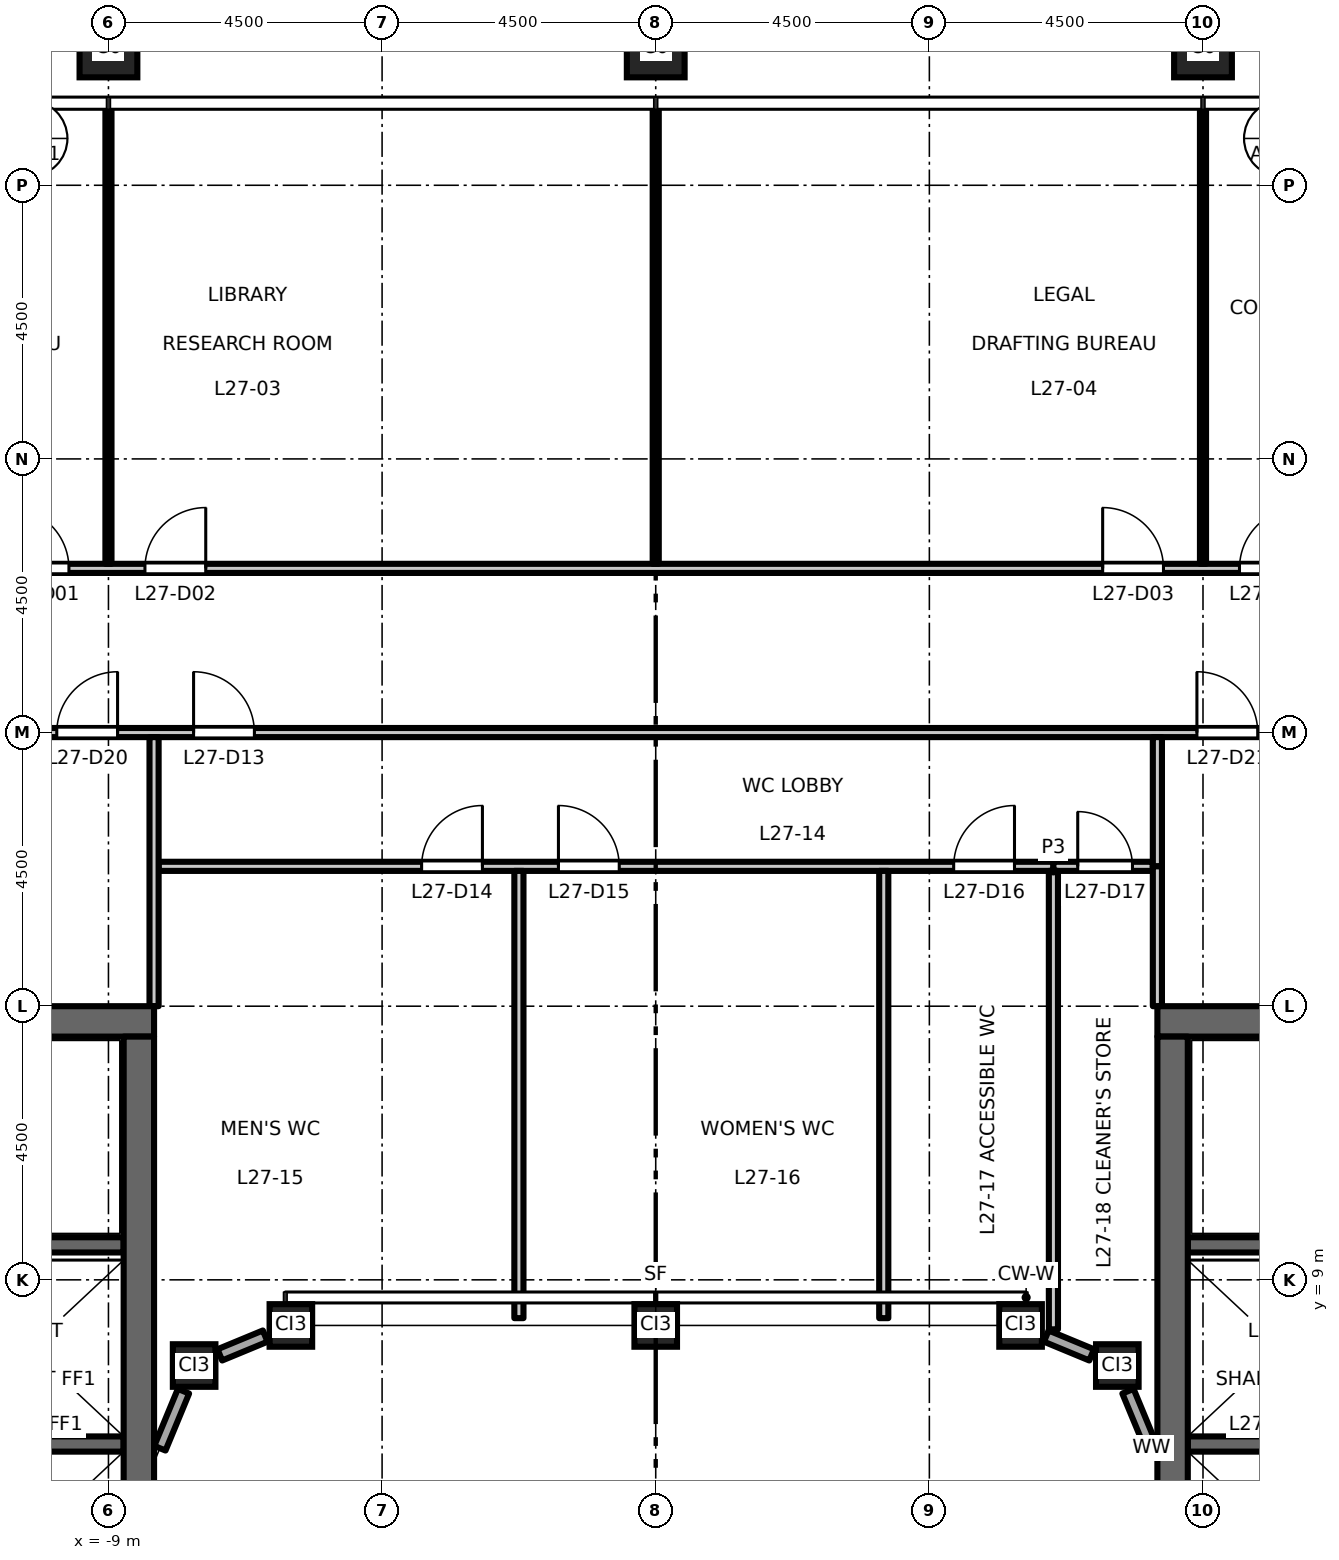
"""IFC4 building model, lengths in metres.
Left out: names, types, materials, properties, quantities, classifications, styles, units other than length and angle.
Written with IfcOpenShell. Run it as: python <this file> out.ifc"""

import sys

from ifc_helpers import new_model, si_unit, direction, frame, frame_2d, origin, origin_2d, place, context, subcontext, project, spatial, rectangle, hollow_rectangle, extrude, element, fill, save


model = new_model("IFC4")
c1 = context("Model", 3, precision=1e-05, world=origin(), true_north=direction((0.0, 1.0)))
c2 = subcontext(c1, "Body", "Model", "MODEL_VIEW")
j1 = project(units=[si_unit("LENGTHUNIT", "METRE"), si_unit("PLANEANGLEUNIT", "RADIAN")], contexts=[c1])
p1 = place(None, origin())
s1 = spatial("IfcSite", under=j1, at=p1, CompositionType="ELEMENT")
p2 = place(p1, origin())
s2 = spatial("IfcBuilding", under=s1, at=p2, CompositionType="ELEMENT")
p3 = place(p2, frame((0.0, 0.0, 127.2)))
s3 = spatial("IfcBuildingStorey", under=s2, at=p3, CompositionType="ELEMENT", Elevation=127.2)
for number, where, z_axis, x_axis in (
    (1, (9.0, 29.25, 0.0), (0.0, 0.0, 1.0), (1.0, 0.0, 0.0)),
    (2, (0.0, 29.25, 0.0), (0.0, 0.0, 1.0), (1.0, 0.0, 0.0)),
    (3, (-9.0, 29.25, 0.0), (0.0, 0.0, 1.0), (1.0, 0.0, 0.0)),
):
    element("IfcColumn", number, at=place(p3, frame(where, z_axis=z_axis, x_axis=x_axis)), inside=s3, PredefinedType="COLUMN", context=c2, shape_type="SweptSolid", body=[
        extrude(hollow_rectangle(XDim=0.95, YDim=0.95, WallThickness=0.055, at=origin_2d()), origin(), (0.0, 0.0, 1.0), 4.5),
    ])
for number, where, z_axis, x_axis in (
    (4, (-7.591, 7.591, 0.0), (0.0, 0.0, 1.0), (1.0, 0.0, 0.0)),
    (5, (-6.0, 8.25, 0.0), (0.0, 0.0, 1.0), (1.0, 0.0, 0.0)),
    (6, (0.0, 8.25, 0.0), (0.0, 0.0, 1.0), (1.0, 0.0, 0.0)),
    (7, (6.0, 8.25, 0.0), (0.0, 0.0, 1.0), (1.0, 0.0, 0.0)),
    (8, (7.591, 7.591, 0.0), (0.0, 0.0, 1.0), (1.0, 0.0, 0.0)),
):
    element("IfcColumn", number, at=place(p3, frame(where, z_axis=z_axis, x_axis=x_axis)), inside=s3, PredefinedType="COLUMN", context=c2, shape_type="SweptSolid", body=[
        extrude(hollow_rectangle(XDim=0.7, YDim=0.7, WallThickness=0.04, at=origin_2d()), origin(), (0.0, 0.0, 1.0), 4.5),
    ])
p4 = place(p3, frame((-8.75, 6.3, 0.0), z_axis=(0.0, 0.0, 1.0), x_axis=(-1.0, 0.0, 0.0)))
e9 = element("IfcWall", 9, at=p4, inside=s3, PredefinedType="SHEAR", context=c2, shape_type="SweptSolid", body=[
    extrude(rectangle(XDim=3.1, YDim=0.25, at=frame_2d((1.55, 0.0))), origin(), (0.0, 0.0, 1.0), 4.35),
])
p5 = place(p3, frame((-8.75, 9.575, 0.0), z_axis=(0.0, 0.0, 1.0), x_axis=(-1.0, 0.0, 0.0)))
e10 = element("IfcWall", 10, at=p5, inside=s3, PredefinedType="SHEAR", context=c2, shape_type="SweptSolid", body=[
    extrude(rectangle(XDim=8.0, YDim=0.25, at=frame_2d((4.0, 0.0))), origin(), (0.0, 0.0, 1.0), 4.35),
])
p6 = place(p5, frame((6.65, 0.0, 0.0)))
e11 = element("IfcOpeningElement", 11, at=p6, cuts=e10, PredefinedType="OPENING", context=c2, shape_type="SweptSolid", body=[
    extrude(rectangle(XDim=1.1, YDim=2.1, at=frame_2d((0.55, 1.05))), frame((0.0, 0.135, 0.0), z_axis=(0.0, -1.0, 0.0), x_axis=(1.0, 0.0, 0.0)), (0.0, 0.0, 1.0), 0.27),
])
p7 = place(p3, frame((-8.25, 13.25, 0.0), z_axis=(0.0, 0.0, 1.0), x_axis=(-1.0, 0.0, 0.0)))
e12 = element("IfcWall", 12, at=p7, inside=s3, PredefinedType="SHEAR", context=c2, shape_type="SweptSolid", body=[
    extrude(rectangle(XDim=13.5, YDim=0.5, at=frame_2d((6.75, 0.0))), origin(), (0.0, 0.0, 1.0), 4.35),
])
p8 = place(p3, frame((-8.5, -13.0, 0.0), z_axis=(0.0, 0.0, 1.0), x_axis=(0.0, 1.0, 0.0)))
e13 = element("IfcWall", 13, at=p8, inside=s3, PredefinedType="SHEAR", context=c2, shape_type="SweptSolid", body=[
    extrude(rectangle(XDim=26.0, YDim=0.5, at=frame_2d((13.0, 0.0))), origin(), (0.0, 0.0, 1.0), 4.35),
])
p9 = place(p3, frame((8.75, 6.3, 0.0), z_axis=(0.0, 0.0, 1.0), x_axis=(1.0, 0.0, 0.0)))
e14 = element("IfcWall", 14, at=p9, inside=s3, PredefinedType="SHEAR", context=c2, shape_type="SweptSolid", body=[
    extrude(rectangle(XDim=3.1, YDim=0.25, at=frame_2d((1.55, 0.0))), origin(), (0.0, 0.0, 1.0), 4.35),
])
p10 = place(p3, frame((8.75, 9.575, 0.0), z_axis=(0.0, 0.0, 1.0), x_axis=(1.0, 0.0, 0.0)))
e15 = element("IfcWall", 15, at=p10, inside=s3, PredefinedType="SHEAR", context=c2, shape_type="SweptSolid", body=[
    extrude(rectangle(XDim=8.0, YDim=0.25, at=frame_2d((4.0, 0.0))), origin(), (0.0, 0.0, 1.0), 4.35),
])
p11 = place(p10, frame((6.65, 0.0, 0.0)))
e16 = element("IfcOpeningElement", 16, at=p11, cuts=e15, PredefinedType="OPENING", context=c2, shape_type="SweptSolid", body=[
    extrude(rectangle(XDim=1.1, YDim=2.1, at=frame_2d((0.55, 1.05))), frame((0.0, 0.135, 0.0), z_axis=(0.0, -1.0, 0.0), x_axis=(1.0, 0.0, 0.0)), (0.0, 0.0, 1.0), 0.27),
])
p12 = place(p3, frame((8.25, 13.25, 0.0), z_axis=(0.0, 0.0, 1.0), x_axis=(1.0, 0.0, 0.0)))
e17 = element("IfcWall", 17, at=p12, inside=s3, PredefinedType="SHEAR", context=c2, shape_type="SweptSolid", body=[
    extrude(rectangle(XDim=13.5, YDim=0.5, at=frame_2d((6.75, 0.0))), origin(), (0.0, 0.0, 1.0), 4.35),
])
p13 = place(p3, frame((8.5, -13.0, 0.0), z_axis=(0.0, 0.0, 1.0), x_axis=(0.0, 1.0, 0.0)))
e18 = element("IfcWall", 18, at=p13, inside=s3, PredefinedType="SHEAR", context=c2, shape_type="SweptSolid", body=[
    extrude(rectangle(XDim=26.0, YDim=0.5, at=frame_2d((13.0, 0.0))), origin(), (0.0, 0.0, 1.0), 4.35),
])
p14 = place(p3, frame((8.154, 6.231, 0.0), z_axis=(0.0, 0.0, 1.0), x_axis=(-0.382769662028, 0.923843810301, 0.0)))
e19 = element("IfcWall", 19, at=p14, inside=s3, PredefinedType="STANDARD", context=c2, shape_type="SweptSolid", body=[
    extrude(rectangle(XDim=1.015, YDim=0.2, at=frame_2d((0.507, 0.0))), origin(), (0.0, 0.0, 1.0), 3.826),
])
for number, where, z_axis, x_axis in (
    (20, (7.168, 7.766, 0.0), (0.0, 0.0, 1.0), (-0.924, 0.383, 0.0)),
    (21, (-6.423, 8.075, 0.0), (0.0, 0.0, 1.0), (-0.924, -0.383, 0.0)),
):
    element("IfcWall", number, at=place(p3, frame(where, z_axis=z_axis, x_axis=x_axis)), inside=s3, PredefinedType="STANDARD", context=c2, shape_type="SweptSolid", body=[
        extrude(rectangle(XDim=0.807, YDim=0.2, at=frame_2d((0.404, 0.0))), origin(), (0.0, 0.0, 1.0), 3.826),
    ])
p15 = place(p3, frame((-7.766, 7.168, 0.0), z_axis=(0.0, 0.0, 1.0), x_axis=(-0.382769662028, -0.923843810301, 0.0)))
e22 = element("IfcWall", 22, at=p15, inside=s3, PredefinedType="STANDARD", context=c2, shape_type="SweptSolid", body=[
    extrude(rectangle(XDim=1.015, YDim=0.2, at=frame_2d((0.507, 0.0))), origin(), (0.0, 0.0, 1.0), 3.826),
])
p16 = place(p3, frame((-8.175, 15.8, 0.0), z_axis=(0.0, 0.0, 1.0), x_axis=(1.0, 0.0, 0.0)))
e23 = element("IfcWall", 23, at=p16, inside=s3, PredefinedType="PARTITIONING", context=c2, shape_type="SweptSolid", body=[
    extrude(rectangle(XDim=14.715, YDim=0.15, at=frame_2d((7.357, 0.0))), origin(), (0.0, 0.0, 1.0), 4.35),
])
p17 = place(p16, frame((4.325, 0.0, 0.0)))
e24 = element("IfcOpeningElement", 24, at=p17, cuts=e23, PredefinedType="OPENING", context=c2, shape_type="SweptSolid", body=[
    extrude(rectangle(XDim=1.0, YDim=2.1, at=frame_2d((0.5, 1.05))), frame((0.0, 0.085, 0.0), z_axis=(0.0, -1.0, 0.0), x_axis=(1.0, 0.0, 0.0)), (0.0, 0.0, 1.0), 0.17),
])
p18 = place(p16, frame((6.575, 0.0, 0.0)))
e25 = element("IfcOpeningElement", 25, at=p18, cuts=e23, PredefinedType="OPENING", context=c2, shape_type="SweptSolid", body=[
    extrude(rectangle(XDim=1.0, YDim=2.1, at=frame_2d((0.5, 1.05))), frame((0.0, 0.085, 0.0), z_axis=(0.0, -1.0, 0.0), x_axis=(1.0, 0.0, 0.0)), (0.0, 0.0, 1.0), 0.17),
])
p19 = place(p16, frame((13.075, 0.0, 0.0)))
e26 = element("IfcOpeningElement", 26, at=p19, cuts=e23, PredefinedType="OPENING", context=c2, shape_type="SweptSolid", body=[
    extrude(rectangle(XDim=1.0, YDim=2.1, at=frame_2d((0.5, 1.05))), frame((0.0, 0.085, 0.0), z_axis=(0.0, -1.0, 0.0), x_axis=(1.0, 0.0, 0.0)), (0.0, 0.0, 1.0), 0.17),
])
p20 = place(p3, frame((6.54, 15.8, 0.0), z_axis=(0.0, 0.0, 1.0), x_axis=(1.0, 0.0, 0.0)))
e27 = element("IfcWall", 27, at=p20, inside=s3, PredefinedType="PARTITIONING", context=c2, shape_type="SweptSolid", body=[
    extrude(rectangle(XDim=1.635, YDim=0.15, at=frame_2d((0.817, 0.0))), origin(), (0.0, 0.0, 1.0), 4.35),
])
p21 = place(p20, frame((0.4, 0.0, 0.0)))
e28 = element("IfcOpeningElement", 28, at=p21, cuts=e27, PredefinedType="OPENING", context=c2, shape_type="SweptSolid", body=[
    extrude(rectangle(XDim=0.9, YDim=2.1, at=frame_2d((0.45, 1.05))), frame((0.0, 0.085, 0.0), z_axis=(0.0, -1.0, 0.0), x_axis=(1.0, 0.0, 0.0)), (0.0, 0.0, 1.0), 0.17),
])
p22 = place(p3, frame((-21.825, 18.0, 0.0), z_axis=(0.0, 0.0, 1.0), x_axis=(1.0, 0.0, 0.0)))
e29 = element("IfcWall", 29, at=p22, inside=s3, PredefinedType="PARTITIONING", context=c2, shape_type="SweptSolid", body=[
    extrude(rectangle(XDim=43.65, YDim=0.15, at=frame_2d((21.825, 0.0))), origin(), (0.0, 0.0, 1.0), 4.35),
])
p23 = place(p22, frame((14.225, 0.0, 0.0)))
e30 = element("IfcOpeningElement", 30, at=p23, cuts=e29, PredefinedType="OPENING", context=c2, shape_type="SweptSolid", body=[
    extrude(rectangle(XDim=1.0, YDim=2.1, at=frame_2d((0.5, 1.05))), frame((0.0, 0.085, 0.0), z_axis=(0.0, -1.0, 0.0), x_axis=(1.0, 0.0, 0.0)), (0.0, 0.0, 1.0), 0.17),
])
p24 = place(p22, frame((11.975, 0.0, 0.0)))
e31 = element("IfcOpeningElement", 31, at=p24, cuts=e29, PredefinedType="OPENING", context=c2, shape_type="SweptSolid", body=[
    extrude(rectangle(XDim=1.0, YDim=2.1, at=frame_2d((0.5, 1.05))), frame((0.0, 0.085, 0.0), z_axis=(0.0, -1.0, 0.0), x_axis=(1.0, 0.0, 0.0)), (0.0, 0.0, 1.0), 0.17),
])
p25 = place(p22, frame((30.725, 0.0, 0.0)))
e32 = element("IfcOpeningElement", 32, at=p25, cuts=e29, PredefinedType="OPENING", context=c2, shape_type="SweptSolid", body=[
    extrude(rectangle(XDim=1.0, YDim=2.1, at=frame_2d((0.5, 1.05))), frame((0.0, 0.085, 0.0), z_axis=(0.0, -1.0, 0.0), x_axis=(1.0, 0.0, 0.0)), (0.0, 0.0, 1.0), 0.17),
])
p26 = place(p3, frame((-27.06, 20.7, 0.0), z_axis=(0.0, 0.0, 1.0), x_axis=(1.0, 0.0, 0.0)))
e33 = element("IfcWall", 33, at=p26, inside=s3, PredefinedType="PARTITIONING", context=c2, shape_type="SweptSolid", body=[
    extrude(rectangle(XDim=54.12, YDim=0.15, at=frame_2d((27.06, 0.0))), origin(), (0.0, 0.0, 1.0), 4.35),
])
p27 = place(p26, frame((16.41, 0.0, 0.0)))
e34 = element("IfcOpeningElement", 34, at=p27, cuts=e33, PredefinedType="OPENING", context=c2, shape_type="SweptSolid", body=[
    extrude(rectangle(XDim=1.0, YDim=2.1, at=frame_2d((0.5, 1.05))), frame((0.0, 0.085, 0.0), z_axis=(0.0, -1.0, 0.0), x_axis=(1.0, 0.0, 0.0)), (0.0, 0.0, 1.0), 0.17),
])
p28 = place(p26, frame((18.66, 0.0, 0.0)))
e35 = element("IfcOpeningElement", 35, at=p28, cuts=e33, PredefinedType="OPENING", context=c2, shape_type="SweptSolid", body=[
    extrude(rectangle(XDim=1.0, YDim=2.1, at=frame_2d((0.5, 1.05))), frame((0.0, 0.085, 0.0), z_axis=(0.0, -1.0, 0.0), x_axis=(1.0, 0.0, 0.0)), (0.0, 0.0, 1.0), 0.17),
])
p29 = place(p26, frame((34.41, 0.0, 0.0)))
e36 = element("IfcOpeningElement", 36, at=p29, cuts=e33, PredefinedType="OPENING", context=c2, shape_type="SweptSolid", body=[
    extrude(rectangle(XDim=1.0, YDim=2.1, at=frame_2d((0.5, 1.05))), frame((0.0, 0.085, 0.0), z_axis=(0.0, -1.0, 0.0), x_axis=(1.0, 0.0, 0.0)), (0.0, 0.0, 1.0), 0.17),
])
p30 = place(p26, frame((36.66, 0.0, 0.0)))
e37 = element("IfcOpeningElement", 37, at=p30, cuts=e33, PredefinedType="OPENING", context=c2, shape_type="SweptSolid", body=[
    extrude(rectangle(XDim=1.0, YDim=2.1, at=frame_2d((0.5, 1.05))), frame((0.0, 0.085, 0.0), z_axis=(0.0, -1.0, 0.0), x_axis=(1.0, 0.0, 0.0)), (0.0, 0.0, 1.0), 0.17),
])
p31 = place(p26, frame((7.41, 0.0, 0.0)))
e38 = element("IfcOpeningElement", 38, at=p31, cuts=e33, PredefinedType="OPENING", context=c2, shape_type="SweptSolid", body=[
    extrude(rectangle(XDim=1.0, YDim=2.1, at=frame_2d((0.5, 1.05))), frame((0.0, 0.085, 0.0), z_axis=(0.0, -1.0, 0.0), x_axis=(1.0, 0.0, 0.0)), (0.0, 0.0, 1.0), 0.17),
])
p32 = place(p26, frame((45.72, 0.0, 0.0)))
e39 = element("IfcOpeningElement", 39, at=p32, cuts=e33, PredefinedType="OPENING", context=c2, shape_type="SweptSolid", body=[
    extrude(rectangle(XDim=1.0, YDim=2.1, at=frame_2d((0.5, 1.05))), frame((0.0, 0.085, 0.0), z_axis=(0.0, -1.0, 0.0), x_axis=(1.0, 0.0, 0.0)), (0.0, 0.0, 1.0), 0.17),
])
p33 = place(p3, frame((-9.0, 20.775, 0.0), z_axis=(0.0, 0.0, 1.0), x_axis=(0.0, 1.0, 0.0)))
e40 = element("IfcWall", 40, at=p33, inside=s3, PredefinedType="PARTITIONING", context=c2, shape_type="SweptSolid", body=[
    extrude(rectangle(XDim=7.485, YDim=0.1, at=frame_2d((3.743, 0.0))), origin(), (0.0, 0.0, 1.0), 3.45),
])
p34 = place(p3, frame((-8.25, 13.5, 0.0), z_axis=(0.0, 0.0, 1.0), x_axis=(0.0, 1.0, 0.0)))
e41 = element("IfcWall", 41, at=p34, inside=s3, PredefinedType="PARTITIONING", context=c2, shape_type="SweptSolid", body=[
    extrude(rectangle(XDim=4.425, YDim=0.15, at=frame_2d((2.212, 0.0))), origin(), (0.0, 0.0, 1.0), 4.35),
])
p35 = place(p3, frame((-2.25, 8.37, 0.0), z_axis=(0.0, 0.0, 1.0), x_axis=(0.0, 1.0, 0.0)))
e42 = element("IfcWall", 42, at=p35, inside=s3, PredefinedType="PARTITIONING", context=c2, shape_type="SweptSolid", body=[
    extrude(rectangle(XDim=7.355, YDim=0.15, at=frame_2d((3.677, 0.0))), origin(), (0.0, 0.0, 1.0), 4.35),
])
p36 = place(p3, frame((0.0, 20.775, 0.0), z_axis=(0.0, 0.0, 1.0), x_axis=(0.0, 1.0, 0.0)))
e43 = element("IfcWall", 43, at=p36, inside=s3, PredefinedType="PARTITIONING", context=c2, shape_type="SweptSolid", body=[
    extrude(rectangle(XDim=7.485, YDim=0.1, at=frame_2d((3.743, 0.0))), origin(), (0.0, 0.0, 1.0), 3.45),
])
p37 = place(p3, frame((3.75, 8.37, 0.0), z_axis=(0.0, 0.0, 1.0), x_axis=(0.0, 1.0, 0.0)))
e44 = element("IfcWall", 44, at=p37, inside=s3, PredefinedType="PARTITIONING", context=c2, shape_type="SweptSolid", body=[
    extrude(rectangle(XDim=7.355, YDim=0.15, at=frame_2d((3.677, 0.0))), origin(), (0.0, 0.0, 1.0), 4.35),
])
p38 = place(p3, frame((6.54, 8.186, 0.0), z_axis=(0.0, 0.0, 1.0), x_axis=(0.0, 1.0, 0.0)))
e45 = element("IfcWall", 45, at=p38, inside=s3, PredefinedType="PARTITIONING", context=c2, shape_type="SweptSolid", body=[
    extrude(rectangle(XDim=7.539, YDim=0.15, at=frame_2d((3.77, 0.0))), origin(), (0.0, 0.0, 1.0), 4.35),
])
p39 = place(p3, frame((8.25, 15.8, 0.0), z_axis=(0.0, 0.0, 1.0), x_axis=(0.0, 1.0, 0.0)))
e46 = element("IfcWall", 46, at=p39, inside=s3, PredefinedType="PARTITIONING", context=c2, shape_type="SweptSolid", body=[
    extrude(rectangle(XDim=2.125, YDim=0.15, at=frame_2d((1.062, 0.0))), origin(), (0.0, 0.0, 1.0), 4.35),
])
p40 = place(p3, frame((8.25, 13.5, 0.0), z_axis=(0.0, 0.0, 1.0), x_axis=(0.0, 1.0, 0.0)))
e47 = element("IfcWall", 47, at=p40, inside=s3, PredefinedType="PARTITIONING", context=c2, shape_type="SweptSolid", body=[
    extrude(rectangle(XDim=2.3, YDim=0.15, at=frame_2d((1.15, 0.0))), origin(), (0.0, 0.0, 1.0), 4.35),
])
p41 = place(p3, frame((9.0, 20.775, 0.0), z_axis=(0.0, 0.0, 1.0), x_axis=(0.0, 1.0, 0.0)))
e48 = element("IfcWall", 48, at=p41, inside=s3, PredefinedType="PARTITIONING", context=c2, shape_type="SweptSolid", body=[
    extrude(rectangle(XDim=7.485, YDim=0.1, at=frame_2d((3.743, 0.0))), origin(), (0.0, 0.0, 1.0), 3.45),
])
p42 = place(p27, origin())
e49 = element("IfcDoor", 49, at=p42, inside=s3, OperationType="SINGLE_SWING_LEFT", PredefinedType="DOOR", context=c2, shape_type="SweptSolid", body=[
    extrude(rectangle(XDim=1.0, YDim=2.1, at=frame_2d((0.5, 1.05))), frame((0.0, 0.025, 0.0), z_axis=(0.0, -1.0, 0.0), x_axis=(1.0, 0.0, 0.0)), (0.0, 0.0, 1.0), 0.05),
])
fill(e34, e49)
p43 = place(p28, origin())
e50 = element("IfcDoor", 50, at=p43, inside=s3, OperationType="SINGLE_SWING_RIGHT", PredefinedType="DOOR", context=c2, shape_type="SweptSolid", body=[
    extrude(rectangle(XDim=1.0, YDim=2.1, at=frame_2d((0.5, 1.05))), frame((0.0, 0.025, 0.0), z_axis=(0.0, -1.0, 0.0), x_axis=(1.0, 0.0, 0.0)), (0.0, 0.0, 1.0), 0.05),
])
fill(e35, e50)
p44 = place(p29, origin())
e51 = element("IfcDoor", 51, at=p44, inside=s3, OperationType="SINGLE_SWING_LEFT", PredefinedType="DOOR", context=c2, shape_type="SweptSolid", body=[
    extrude(rectangle(XDim=1.0, YDim=2.1, at=frame_2d((0.5, 1.05))), frame((0.0, 0.025, 0.0), z_axis=(0.0, -1.0, 0.0), x_axis=(1.0, 0.0, 0.0)), (0.0, 0.0, 1.0), 0.05),
])
fill(e36, e51)
p45 = place(p30, origin())
e52 = element("IfcDoor", 52, at=p45, inside=s3, OperationType="SINGLE_SWING_RIGHT", PredefinedType="DOOR", context=c2, shape_type="SweptSolid", body=[
    extrude(rectangle(XDim=1.0, YDim=2.1, at=frame_2d((0.5, 1.05))), frame((0.0, 0.025, 0.0), z_axis=(0.0, -1.0, 0.0), x_axis=(1.0, 0.0, 0.0)), (0.0, 0.0, 1.0), 0.05),
])
fill(e37, e52)
p46 = place(p23, origin())
e53 = element("IfcDoor", 53, at=p46, inside=s3, OperationType="SINGLE_SWING_LEFT", PredefinedType="DOOR", context=c2, shape_type="SweptSolid", body=[
    extrude(rectangle(XDim=1.0, YDim=2.1, at=frame_2d((0.5, 1.05))), frame((0.0, 0.025, 0.0), z_axis=(0.0, -1.0, 0.0), x_axis=(1.0, 0.0, 0.0)), (0.0, 0.0, 1.0), 0.05),
])
fill(e30, e53)
p47 = place(p17, origin())
e54 = element("IfcDoor", 54, at=p47, inside=s3, OperationType="SINGLE_SWING_RIGHT", PredefinedType="DOOR", context=c2, shape_type="SweptSolid", body=[
    extrude(rectangle(XDim=1.0, YDim=2.1, at=frame_2d((0.5, 1.05))), frame((0.0, 0.025, 0.0), z_axis=(0.0, -1.0, 0.0), x_axis=(1.0, 0.0, 0.0)), (0.0, 0.0, 1.0), 0.05),
])
fill(e24, e54)
p48 = place(p18, origin())
e55 = element("IfcDoor", 55, at=p48, inside=s3, OperationType="SINGLE_SWING_LEFT", PredefinedType="DOOR", context=c2, shape_type="SweptSolid", body=[
    extrude(rectangle(XDim=1.0, YDim=2.1, at=frame_2d((0.5, 1.05))), frame((0.0, 0.025, 0.0), z_axis=(0.0, -1.0, 0.0), x_axis=(1.0, 0.0, 0.0)), (0.0, 0.0, 1.0), 0.05),
])
fill(e25, e55)
p49 = place(p19, origin())
e56 = element("IfcDoor", 56, at=p49, inside=s3, OperationType="SINGLE_SWING_RIGHT", PredefinedType="DOOR", context=c2, shape_type="SweptSolid", body=[
    extrude(rectangle(XDim=1.0, YDim=2.1, at=frame_2d((0.5, 1.05))), frame((0.0, 0.025, 0.0), z_axis=(0.0, -1.0, 0.0), x_axis=(1.0, 0.0, 0.0)), (0.0, 0.0, 1.0), 0.05),
])
fill(e26, e56)
p50 = place(p21, origin())
e57 = element("IfcDoor", 57, at=p50, inside=s3, OperationType="SINGLE_SWING_LEFT", PredefinedType="DOOR", context=c2, shape_type="SweptSolid", body=[
    extrude(rectangle(XDim=0.9, YDim=2.1, at=frame_2d((0.45, 1.05))), frame((0.0, 0.025, 0.0), z_axis=(0.0, -1.0, 0.0), x_axis=(1.0, 0.0, 0.0)), (0.0, 0.0, 1.0), 0.05),
])
fill(e28, e57)
p51 = place(p24, origin())
e58 = element("IfcDoor", 58, at=p51, inside=s3, OperationType="SINGLE_SWING_RIGHT", PredefinedType="DOOR", context=c2, shape_type="SweptSolid", body=[
    extrude(rectangle(XDim=1.0, YDim=2.1, at=frame_2d((0.5, 1.05))), frame((0.0, 0.025, 0.0), z_axis=(0.0, -1.0, 0.0), x_axis=(1.0, 0.0, 0.0)), (0.0, 0.0, 1.0), 0.05),
])
fill(e31, e58)
p52 = place(p25, origin())
e59 = element("IfcDoor", 59, at=p52, inside=s3, OperationType="SINGLE_SWING_LEFT", PredefinedType="DOOR", context=c2, shape_type="SweptSolid", body=[
    extrude(rectangle(XDim=1.0, YDim=2.1, at=frame_2d((0.5, 1.05))), frame((0.0, 0.025, 0.0), z_axis=(0.0, -1.0, 0.0), x_axis=(1.0, 0.0, 0.0)), (0.0, 0.0, 1.0), 0.05),
])
fill(e32, e59)
save(model, sys.argv[1])
